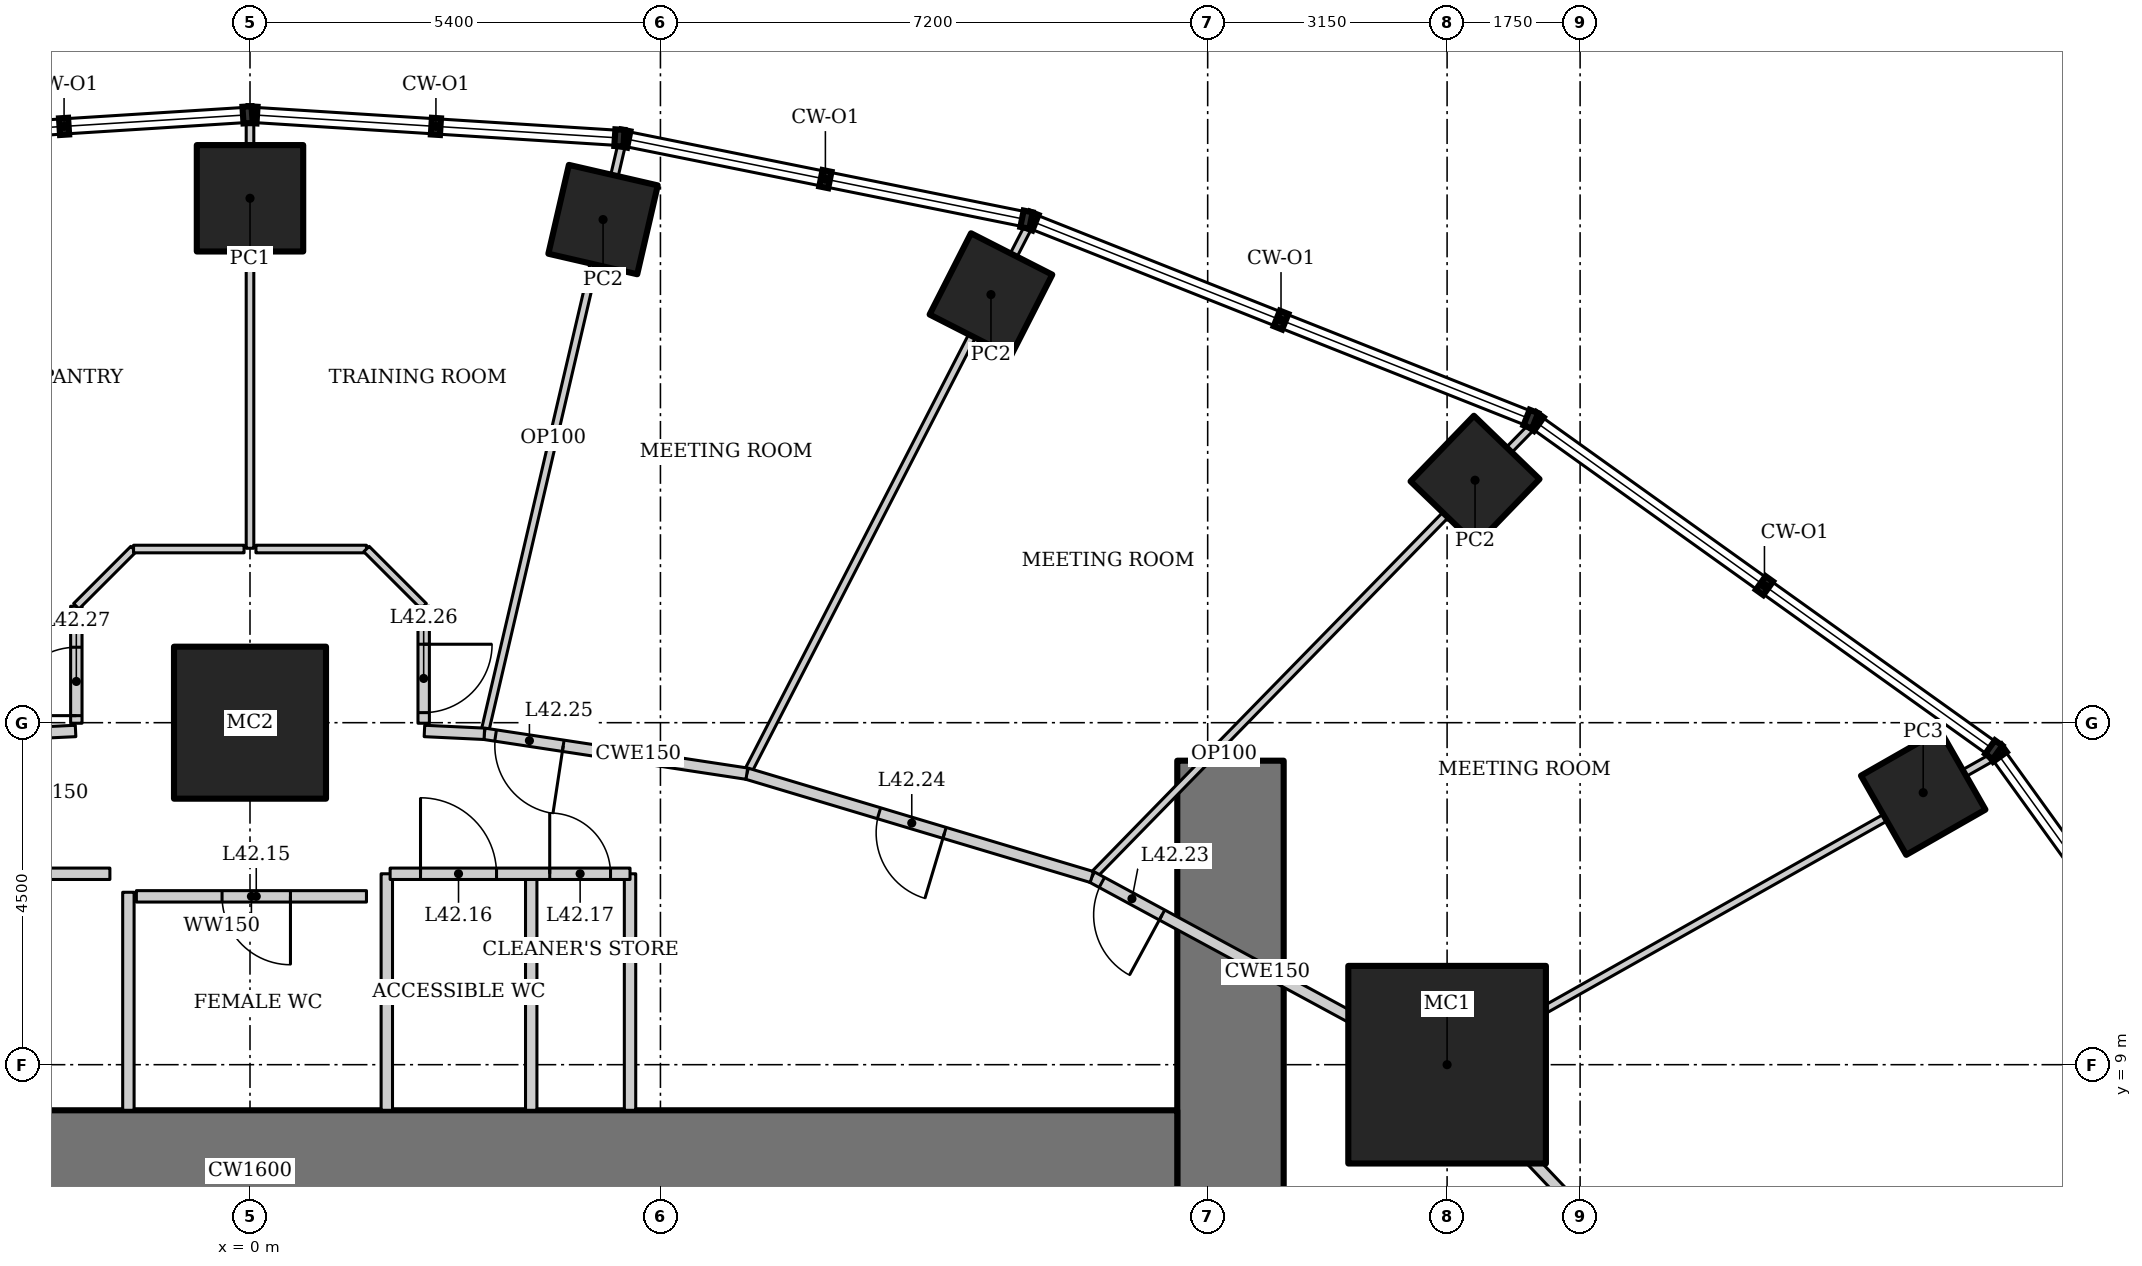
"""IFC4 building model, lengths in metres.
Left out: names, types, materials, properties, quantities, classifications, styles, units other than length and angle.
Written with IfcOpenShell. Run it as: python <this file> out.ifc"""

import sys

from ifc_helpers import new_model, si_unit, direction, frame, frame_2d, origin, origin_2d, place, context, subcontext, project, spatial, rectangle, hollow_rectangle, extrude, element, fill, save


model = new_model("IFC4")
c1 = context("Model", 3, precision=1e-05, world=origin(), true_north=direction((0.0, 1.0)))
c2 = subcontext(c1, "Body", "Model", "MODEL_VIEW")
j1 = project(units=[si_unit("LENGTHUNIT", "METRE"), si_unit("PLANEANGLEUNIT", "RADIAN")], contexts=[c1])
p1 = place(None, origin())
s1 = spatial("IfcSite", under=j1, at=p1, CompositionType="ELEMENT")
p2 = place(p1, origin())
s2 = spatial("IfcBuilding", under=s1, at=p2, CompositionType="ELEMENT")
p3 = place(p2, frame((0.0, 0.0, 180.4)))
s3 = spatial("IfcBuildingStorey", under=s2, at=p3, CompositionType="ELEMENT", Elevation=180.4)
p4 = place(p3, frame((15.75, 9.0, 0.0), z_axis=(0.0, 0.0, 1.0), x_axis=(1.0, 0.0, 0.0)))
e1 = element("IfcColumn", 1, at=p4, inside=s3, PredefinedType="COLUMN", context=c2, shape_type="SweptSolid", body=[
    extrude(hollow_rectangle(XDim=2.6, YDim=2.6, WallThickness=0.13, at=origin_2d()), origin(), (0.0, 0.0, 1.0), 4.2),
])
p5 = place(p3, frame((0.0, 13.5, 0.0), z_axis=(0.0, 0.0, 1.0), x_axis=(1.0, 0.0, 0.0)))
e2 = element("IfcColumn", 2, at=p5, inside=s3, PredefinedType="COLUMN", context=c2, shape_type="SweptSolid", body=[
    extrude(hollow_rectangle(XDim=2.0, YDim=2.0, WallThickness=0.17, at=origin_2d()), origin(), (0.0, 0.0, 1.0), 4.2),
])
p6 = place(p3, frame((22.014, 12.579, 0.0), z_axis=(0.0, 0.0, 1.0), x_axis=(0.86824298017, 0.496139221777, 0.0)))
e3 = element("IfcColumn", 3, at=p6, inside=s3, PredefinedType="COLUMN", context=c2, shape_type="SweptSolid", body=[
    extrude(hollow_rectangle(XDim=1.2, YDim=1.2, WallThickness=0.12, at=origin_2d()), origin(), (0.0, 0.0, 1.0), 4.2),
])
for number, where, z_axis, x_axis in (
    (4, (16.118, 16.69, 0.0), (0.0, 0.0, 1.0), (0.695, 0.719, 0.0)),
    (5, (9.749, 19.133, 0.0), (0.0, 0.0, 1.0), (0.454, 0.891, 0.0)),
    (6, (4.645, 20.12, 0.0), (0.0, 0.0, 1.0), (0.225, 0.974, 0.0)),
):
    element("IfcColumn", number, at=place(p3, frame(where, z_axis=z_axis, x_axis=x_axis)), inside=s3, PredefinedType="COLUMN", context=c2, shape_type="SweptSolid", body=[
        extrude(hollow_rectangle(XDim=1.2, YDim=1.2, WallThickness=0.1, at=origin_2d()), origin(), (0.0, 0.0, 1.0), 4.2),
    ])
p7 = place(p3, frame((0.0, 20.4, 0.0), z_axis=(0.0, 0.0, 1.0), x_axis=(1.0, 0.0, 0.0)))
e7 = element("IfcColumn", 7, at=p7, inside=s3, PredefinedType="COLUMN", context=c2, shape_type="SweptSolid", body=[
    extrude(hollow_rectangle(XDim=1.4, YDim=1.4, WallThickness=0.1, at=origin_2d()), origin(), (0.0, 0.0, 1.0), 4.2),
])
p8 = place(p3, frame((12.9, -13.0, 0.0), z_axis=(0.0, 0.0, 1.0), x_axis=(0.0, 1.0, 0.0)))
e8 = element("IfcWall", 8, at=p8, inside=s3, PredefinedType="SHEAR", context=c2, shape_type="SweptSolid", body=[
    extrude(rectangle(XDim=26.0, YDim=1.4, at=frame_2d((13.0, 0.0))), origin(), (0.0, 0.0, 1.0), 4.2),
])
p9 = place(p8, frame((12.1, 0.0, 0.0)))
e9 = element("IfcOpeningElement", 9, at=p9, cuts=e8, PredefinedType="OPENING", context=c2, shape_type="SweptSolid", body=[
    extrude(rectangle(XDim=1.8, YDim=2.1, at=frame_2d((0.9, 1.05))), frame((0.0, 0.71, 0.0), z_axis=(0.0, -1.0, 0.0), x_axis=(1.0, 0.0, 0.0)), (0.0, 0.0, 1.0), 1.42),
])
p10 = place(p3, frame((12.2, 7.6, 0.0), z_axis=(0.0, 0.0, 1.0), x_axis=(-1.0, 0.0, 0.0)))
e10 = element("IfcWall", 10, at=p10, inside=s3, PredefinedType="SHEAR", context=c2, shape_type="SweptSolid", body=[
    extrude(rectangle(XDim=24.4, YDim=1.6, at=frame_2d((12.2, 0.0))), origin(), (0.0, 0.0, 1.0), 4.2),
])
p11 = place(p3, frame((22.949, 13.059, 0.0), z_axis=(0.0, 0.0, 1.0), x_axis=(-0.871079462611, -0.491142107558, 0.0)))
e11 = element("IfcWall", 11, at=p11, inside=s3, PredefinedType="PARTITIONING", context=c2, shape_type="SweptSolid", body=[
    extrude(rectangle(XDim=8.327, YDim=0.1, at=frame_2d((4.164, 0.0))), origin(), (0.0, 0.0, 1.0), 3.451),
])
p12 = place(p3, frame((16.882, 17.414, 0.0), z_axis=(0.0, 0.0, 1.0), x_axis=(-0.698758056249, -0.715358077348, 0.0)))
e12 = element("IfcWall", 12, at=p12, inside=s3, PredefinedType="PARTITIONING", context=c2, shape_type="SweptSolid", body=[
    extrude(rectangle(XDim=8.31, YDim=0.1, at=frame_2d((4.155, 0.0))), origin(), (0.0, 0.0, 1.0), 3.321),
])
p13 = place(p3, frame((10.253, 20.052, 0.0), z_axis=(0.0, 0.0, 1.0), x_axis=(-0.457535449567, -0.889191381194, 0.0)))
e13 = element("IfcWall", 13, at=p13, inside=s3, PredefinedType="PARTITIONING", context=c2, shape_type="SweptSolid", body=[
    extrude(rectangle(XDim=8.123, YDim=0.1, at=frame_2d((4.061, 0.0))), origin(), (0.0, 0.0, 1.0), 3.349),
])
p14 = place(p3, frame((4.897, 21.135, 0.0), z_axis=(0.0, 0.0, 1.0), x_axis=(-0.227039313577, -0.973885593943, 0.0)))
e14 = element("IfcWall", 14, at=p14, inside=s3, PredefinedType="PARTITIONING", context=c2, shape_type="SweptSolid", body=[
    extrude(rectangle(XDim=7.99, YDim=0.1, at=frame_2d((3.995, 0.0))), origin(), (0.0, 0.0, 1.0), 3.293),
])
p15 = place(p3, frame((19.579, 4.882, 0.0), z_axis=(0.0, 0.0, 1.0), x_axis=(-0.688797257101, 0.72495402517, 0.0)))
e15 = element("IfcWall", 15, at=p15, inside=s3, PredefinedType="PARTITIONING", context=c2, shape_type="SweptSolid", body=[
    extrude(rectangle(XDim=5.638, YDim=0.15, at=frame_2d((2.819, 0.0))), origin(), (0.0, 0.0, 1.0), 4.05),
])
p16 = place(p15, frame((0.15, 0.0, 0.0)))
e16 = element("IfcOpeningElement", 16, at=p16, cuts=e15, PredefinedType="OPENING", context=c2, shape_type="SweptSolid", body=[
    extrude(rectangle(XDim=0.9, YDim=2.1, at=frame_2d((0.45, 1.05))), frame((0.0, 0.085, 0.0), z_axis=(0.0, -1.0, 0.0), x_axis=(1.0, 0.0, 0.0)), (0.0, 0.0, 1.0), 0.17),
])
p17 = place(p3, frame((15.696, 8.969, 0.0), z_axis=(0.0, 0.0, 1.0), x_axis=(-0.879436285334, 0.476016617397, 0.0)))
e17 = element("IfcWall", 17, at=p17, inside=s3, PredefinedType="PARTITIONING", context=c2, shape_type="SweptSolid", body=[
    extrude(rectangle(XDim=5.253, YDim=0.15, at=frame_2d((2.626, 0.0))), origin(), (0.0, 0.0, 1.0), 4.05),
])
p18 = place(p17, frame((4.203, 0.0, 0.0)))
e18 = element("IfcOpeningElement", 18, at=p18, cuts=e17, PredefinedType="OPENING", context=c2, shape_type="SweptSolid", body=[
    extrude(rectangle(XDim=0.9, YDim=2.1, at=frame_2d((0.45, 1.05))), frame((0.0, 0.085, 0.0), z_axis=(0.0, -1.0, 0.0), x_axis=(1.0, 0.0, 0.0)), (0.0, 0.0, 1.0), 0.17),
])
p19 = place(p3, frame((11.076, 11.469, 0.0), z_axis=(0.0, 0.0, 1.0), x_axis=(-0.957933992798, 0.286988615527, 0.0)))
e19 = element("IfcWall", 19, at=p19, inside=s3, PredefinedType="PARTITIONING", context=c2, shape_type="SweptSolid", body=[
    extrude(rectangle(XDim=4.738, YDim=0.15, at=frame_2d((2.369, 0.0))), origin(), (0.0, 0.0, 1.0), 4.05),
])
p20 = place(p19, frame((2.023, 0.0, 0.0)))
e20 = element("IfcOpeningElement", 20, at=p20, cuts=e19, PredefinedType="OPENING", context=c2, shape_type="SweptSolid", body=[
    extrude(rectangle(XDim=0.9, YDim=2.1, at=frame_2d((0.45, 1.05))), frame((0.0, 0.085, 0.0), z_axis=(0.0, -1.0, 0.0), x_axis=(1.0, 0.0, 0.0)), (0.0, 0.0, 1.0), 0.17),
])
p21 = place(p3, frame((6.537, 12.829, 0.0), z_axis=(0.0, 0.0, 1.0), x_axis=(-0.988668719464, 0.150113833987, 0.0)))
e21 = element("IfcWall", 21, at=p21, inside=s3, PredefinedType="PARTITIONING", context=c2, shape_type="SweptSolid", body=[
    extrude(rectangle(XDim=3.493, YDim=0.15, at=frame_2d((1.747, 0.0))), origin(), (0.0, 0.0, 1.0), 4.05),
])
p22 = place(p21, frame((2.444, 0.0, 0.0)))
e22 = element("IfcOpeningElement", 22, at=p22, cuts=e21, PredefinedType="OPENING", context=c2, shape_type="SweptSolid", body=[
    extrude(rectangle(XDim=0.9, YDim=2.1, at=frame_2d((0.45, 1.05))), frame((0.0, 0.085, 0.0), z_axis=(0.0, -1.0, 0.0), x_axis=(1.0, 0.0, 0.0)), (0.0, 0.0, 1.0), 0.17),
])
for number, where, z_axis, x_axis in (
    (23, (5.0, 8.4, 0.0), (0.0, 0.0, 1.0), (0.0, 1.0, 0.0)),
    (24, (1.8, 8.4, 0.0), (0.0, 0.0, 1.0), (0.0, 1.0, 0.0)),
    (25, (3.7, 8.4, 0.0), (0.0, 0.0, 1.0), (0.0, 1.0, 0.0)),
):
    element("IfcWall", number, at=place(p3, frame(where, z_axis=z_axis, x_axis=x_axis)), inside=s3, PredefinedType="SOLIDWALL", context=c2, shape_type="SweptSolid", body=[
        extrude(rectangle(XDim=3.112, YDim=0.15, at=frame_2d((1.556, 0.0))), origin(), (0.0, 0.0, 1.0), 4.05),
    ])
p23 = place(p3, frame((12.9, 13.0, 0.0), z_axis=(0.0, 0.0, 1.0), x_axis=(-0.714845300066, 0.699282630253, 0.0)))
e26 = element("IfcWall", 26, at=p23, inside=s3, PredefinedType="PARTITIONING", context=c2, shape_type="SweptSolid", body=[
    extrude(rectangle(XDim=0.235, YDim=0.1, at=frame_2d((0.118, 0.0))), origin(), (0.0, 0.0, 1.0), 4.05),
])
p24 = place(p3, frame((0.0, 21.445, 0.0), z_axis=(0.0, 0.0, 1.0), x_axis=(0.0, -1.0, 0.0)))
e27 = element("IfcWall", 27, at=p24, inside=s3, PredefinedType="PARTITIONING", context=c2, shape_type="SweptSolid", body=[
    extrude(rectangle(XDim=5.65, YDim=0.1, at=frame_2d((2.825, 0.0))), origin(), (0.0, 0.0, 1.0), 3.646),
])
for number, where, z_axis, x_axis in (
    (28, (3.083, 13.354, 0.0), (0.0, 0.0, 1.0), (-0.999, 0.047, 0.0)),
    (29, (-2.295, 13.391, 0.0), (0.0, 0.0, 1.0), (-0.999, -0.047, 0.0)),
):
    element("IfcWall", number, at=place(p3, frame(where, z_axis=z_axis, x_axis=x_axis)), inside=s3, PredefinedType="PARTITIONING", context=c2, shape_type="SweptSolid", body=[
        extrude(rectangle(XDim=0.789, YDim=0.15, at=frame_2d((0.395, 0.0))), origin(), (0.0, 0.0, 1.0), 4.05),
    ])
p25 = place(p3, frame((-5.0, 11.512, 0.0), z_axis=(0.0, 0.0, 1.0), x_axis=(1.0, 0.0, 0.0)))
e30 = element("IfcWall", 30, at=p25, inside=s3, PredefinedType="SOLIDWALL", context=c2, shape_type="SweptSolid", body=[
    extrude(rectangle(XDim=3.156, YDim=0.15, at=frame_2d((1.578, 0.0))), origin(), (0.0, 0.0, 1.0), 4.05),
])
p26 = place(p25, frame((1.25, 0.0, 0.0)))
e31 = element("IfcOpeningElement", 31, at=p26, cuts=e30, PredefinedType="OPENING", context=c2, shape_type="SweptSolid", body=[
    extrude(rectangle(XDim=0.9, YDim=2.1, at=frame_2d((0.45, 1.05))), frame((0.0, 0.085, 0.0), z_axis=(0.0, -1.0, 0.0), x_axis=(1.0, 0.0, 0.0)), (0.0, 0.0, 1.0), 0.17),
])
p27 = place(p3, frame((1.844, 11.512, 0.0), z_axis=(0.0, 0.0, 1.0), x_axis=(1.0, 0.0, 0.0)))
e32 = element("IfcWall", 32, at=p27, inside=s3, PredefinedType="SOLIDWALL", context=c2, shape_type="SweptSolid", body=[
    extrude(rectangle(XDim=3.156, YDim=0.15, at=frame_2d((1.578, 0.0))), origin(), (0.0, 0.0, 1.0), 4.05),
])
p28 = place(p27, frame((0.4, 0.0, 0.0)))
e33 = element("IfcOpeningElement", 33, at=p28, cuts=e32, PredefinedType="OPENING", context=c2, shape_type="SweptSolid", body=[
    extrude(rectangle(XDim=1.0, YDim=2.1, at=frame_2d((0.5, 1.05))), frame((0.0, 0.085, 0.0), z_axis=(0.0, -1.0, 0.0), x_axis=(1.0, 0.0, 0.0)), (0.0, 0.0, 1.0), 0.17),
])
p29 = place(p27, frame((2.1, 0.0, 0.0)))
e34 = element("IfcOpeningElement", 34, at=p29, cuts=e32, PredefinedType="OPENING", context=c2, shape_type="SweptSolid", body=[
    extrude(rectangle(XDim=0.8, YDim=2.1, at=frame_2d((0.4, 1.05))), frame((0.0, 0.085, 0.0), z_axis=(0.0, -1.0, 0.0), x_axis=(1.0, 0.0, 0.0)), (0.0, 0.0, 1.0), 0.17),
])
p30 = place(p3, frame((-1.6, 8.4, 0.0), z_axis=(0.0, 0.0, 1.0), x_axis=(0.0, 1.0, 0.0)))
e35 = element("IfcWall", 35, at=p30, inside=s3, PredefinedType="SOLIDWALL", context=c2, shape_type="SweptSolid", body=[
    extrude(rectangle(XDim=2.869, YDim=0.15, at=frame_2d((1.434, 0.0))), origin(), (0.0, 0.0, 1.0), 4.05),
])
p31 = place(p3, frame((1.532, 11.215, 0.0), z_axis=(0.0, 0.0, 1.0), x_axis=(-1.0, 0.0, 0.0)))
e36 = element("IfcWall", 36, at=p31, inside=s3, PredefinedType="SOLIDWALL", context=c2, shape_type="SweptSolid", body=[
    extrude(rectangle(XDim=3.027, YDim=0.15, at=frame_2d((1.514, 0.0))), origin(), (0.0, 0.0, 1.0), 4.05),
])
p32 = place(p31, frame((1.0, 0.0, 0.0)))
e37 = element("IfcOpeningElement", 37, at=p32, cuts=e36, PredefinedType="OPENING", context=c2, shape_type="SweptSolid", body=[
    extrude(rectangle(XDim=0.9, YDim=2.1, at=frame_2d((0.45, 1.05))), frame((0.0, 0.085, 0.0), z_axis=(0.0, -1.0, 0.0), x_axis=(1.0, 0.0, 0.0)), (0.0, 0.0, 1.0), 0.17),
])
p33 = place(p3, frame((0.078, 15.785, 0.0), z_axis=(0.0, 0.0, 1.0), x_axis=(1.0, 0.0, 0.0)))
e38 = element("IfcWall", 38, at=p33, inside=s3, PredefinedType="PARTITIONING", context=c2, shape_type="SweptSolid", body=[
    extrude(rectangle(XDim=1.454, YDim=0.1, at=frame_2d((0.727, 0.0))), origin(), (0.0, 0.0, 1.0), 4.05),
])
p34 = place(p3, frame((1.532, 15.785, 0.0), z_axis=(0.0, 0.0, 1.0), x_axis=(0.707106781187, -0.707106781187, 0.0)))
e39 = element("IfcWall", 39, at=p34, inside=s3, PredefinedType="PARTITIONING", context=c2, shape_type="SweptSolid", body=[
    extrude(rectangle(XDim=1.064, YDim=0.1, at=frame_2d((0.532, 0.0))), origin(), (0.0, 0.0, 1.0), 4.05),
])
p35 = place(p3, frame((2.285, 15.032, 0.0), z_axis=(0.0, 0.0, 1.0), x_axis=(0.0, -1.0, 0.0)))
e40 = element("IfcWall", 40, at=p35, inside=s3, PredefinedType="PARTITIONING", context=c2, shape_type="SweptSolid", body=[
    extrude(rectangle(XDim=1.54, YDim=0.15, at=frame_2d((0.77, 0.0))), origin(), (0.0, 0.0, 1.0), 4.05),
])
p36 = place(p35, frame((0.5, 0.0, 0.0)))
e41 = element("IfcOpeningElement", 41, at=p36, cuts=e40, PredefinedType="OPENING", context=c2, shape_type="SweptSolid", body=[
    extrude(rectangle(XDim=0.9, YDim=2.1, at=frame_2d((0.45, 1.05))), frame((0.0, 0.085, 0.0), z_axis=(0.0, -1.0, 0.0), x_axis=(1.0, 0.0, 0.0)), (0.0, 0.0, 1.0), 0.17),
])
p37 = place(p3, frame((-2.285, 13.493, 0.0), z_axis=(0.0, 0.0, 1.0), x_axis=(0.0, 1.0, 0.0)))
e42 = element("IfcWall", 42, at=p37, inside=s3, PredefinedType="PARTITIONING", context=c2, shape_type="SweptSolid", body=[
    extrude(rectangle(XDim=1.54, YDim=0.15, at=frame_2d((0.77, 0.0))), origin(), (0.0, 0.0, 1.0), 4.05),
])
p38 = place(p37, frame((0.1, 0.0, 0.0)))
e43 = element("IfcOpeningElement", 43, at=p38, cuts=e42, PredefinedType="OPENING", context=c2, shape_type="SweptSolid", body=[
    extrude(rectangle(XDim=0.9, YDim=2.1, at=frame_2d((0.45, 1.05))), frame((0.0, 0.085, 0.0), z_axis=(0.0, -1.0, 0.0), x_axis=(1.0, 0.0, 0.0)), (0.0, 0.0, 1.0), 0.17),
])
p39 = place(p3, frame((-2.285, 15.032, 0.0), z_axis=(0.0, 0.0, 1.0), x_axis=(0.707106781187, 0.707106781187, 0.0)))
e44 = element("IfcWall", 44, at=p39, inside=s3, PredefinedType="PARTITIONING", context=c2, shape_type="SweptSolid", body=[
    extrude(rectangle(XDim=1.064, YDim=0.1, at=frame_2d((0.532, 0.0))), origin(), (0.0, 0.0, 1.0), 4.05),
])
p40 = place(p3, frame((-1.532, 15.785, 0.0), z_axis=(0.0, 0.0, 1.0), x_axis=(1.0, 0.0, 0.0)))
e45 = element("IfcWall", 45, at=p40, inside=s3, PredefinedType="PARTITIONING", context=c2, shape_type="SweptSolid", body=[
    extrude(rectangle(XDim=1.454, YDim=0.1, at=frame_2d((0.727, 0.0))), origin(), (0.0, 0.0, 1.0), 4.05),
])
p41 = place(p32, origin())
e46 = element("IfcDoor", 46, at=p41, inside=s3, OperationType="SINGLE_SWING_LEFT", PredefinedType="DOOR", context=c2, shape_type="SweptSolid", body=[
    extrude(rectangle(XDim=0.9, YDim=2.1, at=frame_2d((0.45, 1.05))), frame((0.0, 0.025, 0.0), z_axis=(0.0, -1.0, 0.0), x_axis=(1.0, 0.0, 0.0)), (0.0, 0.0, 1.0), 0.05),
])
fill(e37, e46)
p42 = place(p28, origin())
e47 = element("IfcDoor", 47, at=p42, inside=s3, OperationType="SINGLE_SWING_LEFT", PredefinedType="DOOR", context=c2, shape_type="SweptSolid", body=[
    extrude(rectangle(XDim=1.0, YDim=2.1, at=frame_2d((0.5, 1.05))), frame((0.0, 0.025, 0.0), z_axis=(0.0, -1.0, 0.0), x_axis=(1.0, 0.0, 0.0)), (0.0, 0.0, 1.0), 0.05),
])
fill(e33, e47)
p43 = place(p29, origin())
e48 = element("IfcDoor", 48, at=p43, inside=s3, OperationType="SINGLE_SWING_LEFT", PredefinedType="DOOR", context=c2, shape_type="SweptSolid", body=[
    extrude(rectangle(XDim=0.8, YDim=2.1, at=frame_2d((0.4, 1.05))), frame((0.0, 0.025, 0.0), z_axis=(0.0, -1.0, 0.0), x_axis=(1.0, 0.0, 0.0)), (0.0, 0.0, 1.0), 0.05),
])
fill(e34, e48)
p44 = place(p18, origin())
e49 = element("IfcDoor", 49, at=p44, inside=s3, OperationType="SINGLE_SWING_LEFT", PredefinedType="DOOR", context=c2, shape_type="SweptSolid", body=[
    extrude(rectangle(XDim=0.9, YDim=2.1, at=frame_2d((0.45, 1.05))), frame((0.0, 0.025, 0.0), z_axis=(0.0, -1.0, 0.0), x_axis=(1.0, 0.0, 0.0)), (0.0, 0.0, 1.0), 0.05),
])
fill(e18, e49)
p45 = place(p20, origin())
e50 = element("IfcDoor", 50, at=p45, inside=s3, OperationType="SINGLE_SWING_LEFT", PredefinedType="DOOR", context=c2, shape_type="SweptSolid", body=[
    extrude(rectangle(XDim=0.9, YDim=2.1, at=frame_2d((0.45, 1.05))), frame((0.0, 0.025, 0.0), z_axis=(0.0, -1.0, 0.0), x_axis=(1.0, 0.0, 0.0)), (0.0, 0.0, 1.0), 0.05),
])
fill(e20, e50)
p46 = place(p22, origin())
e51 = element("IfcDoor", 51, at=p46, inside=s3, OperationType="SINGLE_SWING_LEFT", PredefinedType="DOOR", context=c2, shape_type="SweptSolid", body=[
    extrude(rectangle(XDim=0.9, YDim=2.1, at=frame_2d((0.45, 1.05))), frame((0.0, 0.025, 0.0), z_axis=(0.0, -1.0, 0.0), x_axis=(1.0, 0.0, 0.0)), (0.0, 0.0, 1.0), 0.05),
])
fill(e22, e51)
p47 = place(p36, origin())
e52 = element("IfcDoor", 52, at=p47, inside=s3, OperationType="SINGLE_SWING_LEFT", PredefinedType="DOOR", context=c2, shape_type="SweptSolid", body=[
    extrude(rectangle(XDim=0.9, YDim=2.1, at=frame_2d((0.45, 1.05))), frame((0.0, 0.025, 0.0), z_axis=(0.0, -1.0, 0.0), x_axis=(1.0, 0.0, 0.0)), (0.0, 0.0, 1.0), 0.05),
])
fill(e41, e52)
p48 = place(p38, origin())
e53 = element("IfcDoor", 53, at=p48, inside=s3, OperationType="SINGLE_SWING_LEFT", PredefinedType="DOOR", context=c2, shape_type="SweptSolid", body=[
    extrude(rectangle(XDim=0.9, YDim=2.1, at=frame_2d((0.45, 1.05))), frame((0.0, 0.025, 0.0), z_axis=(0.0, -1.0, 0.0), x_axis=(1.0, 0.0, 0.0)), (0.0, 0.0, 1.0), 0.05),
])
fill(e43, e53)
save(model, sys.argv[1])
